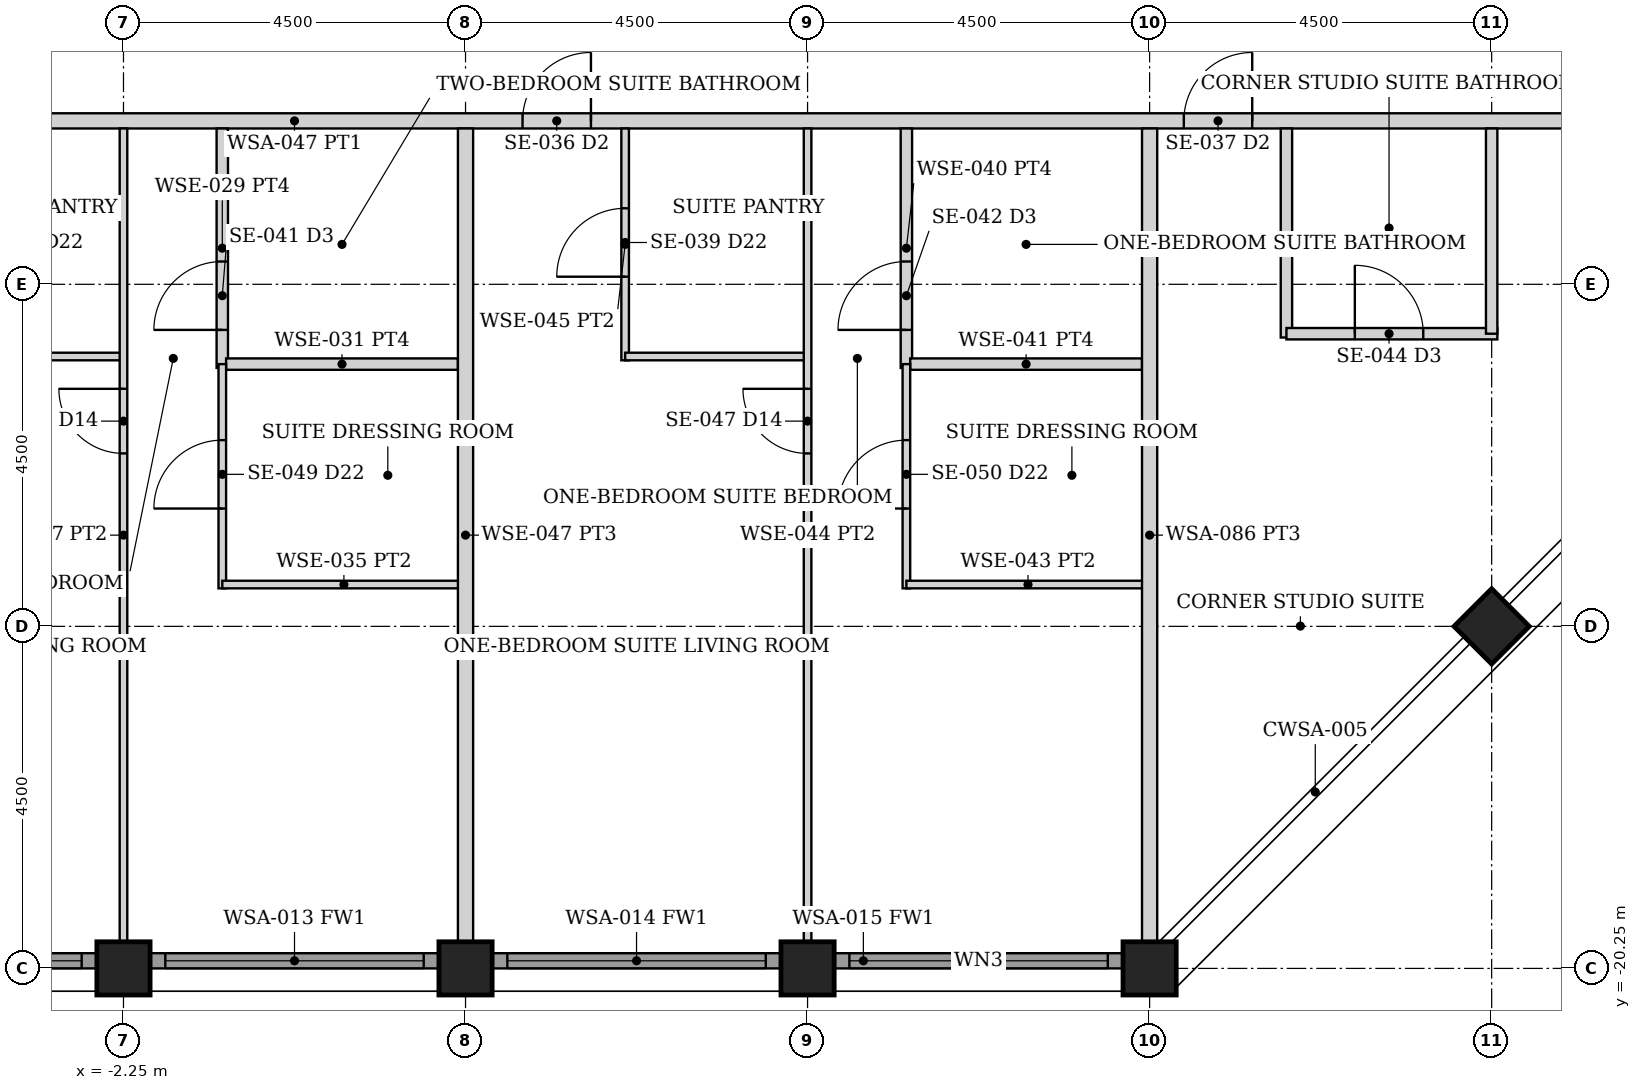
"""IFC4 building model, lengths in metres.
Left out: names, types, materials, properties, quantities, classifications, styles, units other than length and angle.
Written with IfcOpenShell. Run it as: python <this file> out.ifc"""

import sys

from ifc_helpers import new_model, si_unit, direction, frame, frame_2d, origin, origin_2d, place, context, subcontext, project, spatial, rectangle, hollow_rectangle, extrude, element, fill, save


model = new_model("IFC4")
c1 = context("Model", 3, precision=1e-05, world=origin(), true_north=direction((0.0, 1.0)))
c2 = subcontext(c1, "Body", "Model", "MODEL_VIEW")
j1 = project(units=[si_unit("LENGTHUNIT", "METRE"), si_unit("PLANEANGLEUNIT", "RADIAN")], contexts=[c1])
p1 = place(None, origin())
s1 = spatial("IfcSite", under=j1, at=p1, CompositionType="ELEMENT")
p2 = place(p1, origin())
s2 = spatial("IfcBuilding", under=s1, at=p2, CompositionType="ELEMENT")
p3 = place(p2, frame((0.0, 0.0, 245.8)))
s3 = spatial("IfcBuildingStorey", under=s2, at=p3, CompositionType="ELEMENT", Elevation=245.8)
for number, where, z_axis, x_axis in (
    (1, (-2.25, -20.25, 0.0), (0.0, 0.0, 1.0), (0.0, 1.0, 0.0)),
    (2, (2.25, -20.25, 0.0), (0.0, 0.0, 1.0), (0.0, 1.0, 0.0)),
    (3, (6.75, -20.25, 0.0), (0.0, 0.0, 1.0), (0.0, 1.0, 0.0)),
    (4, (11.25, -20.25, 0.0), (0.0, 0.0, 1.0), (0.0, 1.0, 0.0)),
    (5, (15.75, -15.75, 0.0), (0.0, 0.0, 1.0), (0.707, -0.707, 0.0)),
):
    element("IfcColumn", number, at=place(p3, frame(where, z_axis=z_axis, x_axis=x_axis)), inside=s3, PredefinedType="COLUMN", context=c2, shape_type="SweptSolid", body=[
        extrude(hollow_rectangle(XDim=0.7, YDim=0.7, WallThickness=0.035, at=origin_2d()), origin(), (0.0, 0.0, 1.0), 3.75),
    ])
p4 = place(p3, frame((-6.395, -20.15, 0.0), z_axis=(0.0, 0.0, 1.0), x_axis=(1.0, 0.0, 0.0)))
e6 = element("IfcWall", 6, at=p4, inside=s3, PredefinedType="SOLIDWALL", context=c2, shape_type="SweptSolid", body=[
    extrude(rectangle(XDim=3.79, YDim=0.2, at=frame_2d((1.895, 0.0))), origin(), (0.0, 0.0, 1.0), 2.629),
])
p5 = place(p4, frame((0.195, 0.0, 0.3)))
e7 = element("IfcOpeningElement", 7, at=p5, cuts=e6, PredefinedType="OPENING", context=c2, shape_type="SweptSolid", body=[
    extrude(rectangle(XDim=3.4, YDim=2.179, at=frame_2d((1.7, 1.089))), frame((0.0, 0.11, 0.0), z_axis=(0.0, -1.0, 0.0), x_axis=(1.0, 0.0, 0.0)), (0.0, 0.0, 1.0), 0.22),
])
p6 = place(p3, frame((-1.895, -20.15, 0.0), z_axis=(0.0, 0.0, 1.0), x_axis=(1.0, 0.0, 0.0)))
e8 = element("IfcWall", 8, at=p6, inside=s3, PredefinedType="SOLIDWALL", context=c2, shape_type="SweptSolid", body=[
    extrude(rectangle(XDim=3.79, YDim=0.2, at=frame_2d((1.895, 0.0))), origin(), (0.0, 0.0, 1.0), 2.629),
])
p7 = place(p6, frame((0.195, 0.0, 0.3)))
e9 = element("IfcOpeningElement", 9, at=p7, cuts=e8, PredefinedType="OPENING", context=c2, shape_type="SweptSolid", body=[
    extrude(rectangle(XDim=3.4, YDim=2.179, at=frame_2d((1.7, 1.089))), frame((0.0, 0.11, 0.0), z_axis=(0.0, -1.0, 0.0), x_axis=(1.0, 0.0, 0.0)), (0.0, 0.0, 1.0), 0.22),
])
p8 = place(p3, frame((2.605, -20.15, 0.0), z_axis=(0.0, 0.0, 1.0), x_axis=(1.0, 0.0, 0.0)))
e10 = element("IfcWall", 10, at=p8, inside=s3, PredefinedType="SOLIDWALL", context=c2, shape_type="SweptSolid", body=[
    extrude(rectangle(XDim=3.79, YDim=0.2, at=frame_2d((1.895, 0.0))), origin(), (0.0, 0.0, 1.0), 2.629),
])
p9 = place(p8, frame((0.195, 0.0, 0.3)))
e11 = element("IfcOpeningElement", 11, at=p9, cuts=e10, PredefinedType="OPENING", context=c2, shape_type="SweptSolid", body=[
    extrude(rectangle(XDim=3.4, YDim=2.179, at=frame_2d((1.7, 1.089))), frame((0.0, 0.11, 0.0), z_axis=(0.0, -1.0, 0.0), x_axis=(1.0, 0.0, 0.0)), (0.0, 0.0, 1.0), 0.22),
])
p10 = place(p3, frame((7.105, -20.15, 0.0), z_axis=(0.0, 0.0, 1.0), x_axis=(1.0, 0.0, 0.0)))
e12 = element("IfcWall", 12, at=p10, inside=s3, PredefinedType="SOLIDWALL", context=c2, shape_type="SweptSolid", body=[
    extrude(rectangle(XDim=3.79, YDim=0.2, at=frame_2d((1.895, 0.0))), origin(), (0.0, 0.0, 1.0), 2.629),
])
p11 = place(p10, frame((0.195, 0.0, 0.3)))
e13 = element("IfcOpeningElement", 13, at=p11, cuts=e12, PredefinedType="OPENING", context=c2, shape_type="SweptSolid", body=[
    extrude(rectangle(XDim=3.4, YDim=2.179, at=frame_2d((1.7, 1.089))), frame((0.0, 0.11, 0.0), z_axis=(0.0, -1.0, 0.0), x_axis=(1.0, 0.0, 0.0)), (0.0, 0.0, 1.0), 0.22),
])
p12 = place(p3, frame((-20.05, -9.1, 0.0), z_axis=(0.0, 0.0, 1.0), x_axis=(1.0, 0.0, 0.0)))
e14 = element("IfcWall", 14, at=p12, inside=s3, PredefinedType="PARTITIONING", context=c2, shape_type="SweptSolid", body=[
    extrude(rectangle(XDim=40.1, YDim=0.2, at=frame_2d((20.05, 0.0))), origin(), (0.0, 0.0, 1.0), 2.629),
])
p13 = place(p12, frame((14.05, 0.0, 0.0)))
e15 = element("IfcOpeningElement", 15, at=p13, cuts=e14, PredefinedType="OPENING", context=c2, shape_type="SweptSolid", body=[
    extrude(rectangle(XDim=0.9, YDim=2.1, at=frame_2d((0.45, 1.05))), frame((0.0, 0.11, 0.0), z_axis=(0.0, -1.0, 0.0), x_axis=(1.0, 0.0, 0.0)), (0.0, 0.0, 1.0), 0.22),
])
p14 = place(p12, frame((23.05, 0.0, 0.0)))
e16 = element("IfcOpeningElement", 16, at=p14, cuts=e14, PredefinedType="OPENING", context=c2, shape_type="SweptSolid", body=[
    extrude(rectangle(XDim=0.9, YDim=2.1, at=frame_2d((0.45, 1.05))), frame((0.0, 0.11, 0.0), z_axis=(0.0, -1.0, 0.0), x_axis=(1.0, 0.0, 0.0)), (0.0, 0.0, 1.0), 0.22),
])
p15 = place(p12, frame((31.75, 0.0, 0.0)))
e17 = element("IfcOpeningElement", 17, at=p15, cuts=e14, PredefinedType="OPENING", context=c2, shape_type="SweptSolid", body=[
    extrude(rectangle(XDim=0.9, YDim=2.1, at=frame_2d((0.45, 1.05))), frame((0.0, 0.11, 0.0), z_axis=(0.0, -1.0, 0.0), x_axis=(1.0, 0.0, 0.0)), (0.0, 0.0, 1.0), 0.22),
])
p16 = place(p12, frame((7.45, 0.0, 0.0)))
e18 = element("IfcOpeningElement", 18, at=p16, cuts=e14, PredefinedType="OPENING", context=c2, shape_type="SweptSolid", body=[
    extrude(rectangle(XDim=0.9, YDim=2.1, at=frame_2d((0.45, 1.05))), frame((0.0, 0.11, 0.0), z_axis=(0.0, -1.0, 0.0), x_axis=(1.0, 0.0, 0.0)), (0.0, 0.0, 1.0), 0.22),
])
p17 = place(p3, frame((-4.65, -12.2, 0.0), z_axis=(0.0, 0.0, 1.0), x_axis=(1.0, 0.0, 0.0)))
e19 = element("IfcWall", 19, at=p17, inside=s3, PredefinedType="PARTITIONING", context=c2, shape_type="SweptSolid", body=[
    extrude(rectangle(XDim=2.4, YDim=0.1, at=frame_2d((1.2, 0.0))), origin(), (0.0, 0.0, 1.0), 2.629),
])
p18 = place(p3, frame((-2.25, -19.9, 0.0), z_axis=(0.0, 0.0, 1.0), x_axis=(0.0, 1.0, 0.0)))
e20 = element("IfcWall", 20, at=p18, inside=s3, PredefinedType="PARTITIONING", context=c2, shape_type="SweptSolid", body=[
    extrude(rectangle(XDim=10.7, YDim=0.1, at=frame_2d((5.35, 0.0))), origin(), (0.0, 0.0, 1.0), 2.629),
])
p19 = place(p18, frame((6.425, 0.0, 0.0)))
e21 = element("IfcOpeningElement", 21, at=p19, cuts=e20, PredefinedType="OPENING", context=c2, shape_type="SweptSolid", body=[
    extrude(rectangle(XDim=0.85, YDim=2.1, at=frame_2d((0.425, 1.05))), frame((0.0, 0.06, 0.0), z_axis=(0.0, -1.0, 0.0), x_axis=(1.0, 0.0, 0.0)), (0.0, 0.0, 1.0), 0.12),
])
p20 = place(p3, frame((-0.95, -12.35, 0.0), z_axis=(0.0, 0.0, 1.0), x_axis=(0.0, 1.0, 0.0)))
e22 = element("IfcWall", 22, at=p20, inside=s3, PredefinedType="PARTITIONING", context=c2, shape_type="SweptSolid", body=[
    extrude(rectangle(XDim=3.15, YDim=0.15, at=frame_2d((1.575, 0.0))), origin(), (0.0, 0.0, 1.0), 2.629),
])
p21 = place(p20, frame((0.5, 0.0, 0.0)))
e23 = element("IfcOpeningElement", 23, at=p21, cuts=e22, PredefinedType="OPENING", context=c2, shape_type="SweptSolid", body=[
    extrude(rectangle(XDim=0.9, YDim=2.1, at=frame_2d((0.45, 1.05))), frame((0.0, 0.085, 0.0), z_axis=(0.0, -1.0, 0.0), x_axis=(1.0, 0.0, 0.0)), (0.0, 0.0, 1.0), 0.17),
])
p22 = place(p3, frame((-0.9, -12.3, 0.0), z_axis=(0.0, 0.0, 1.0), x_axis=(1.0, 0.0, 0.0)))
e24 = element("IfcWall", 24, at=p22, inside=s3, PredefinedType="PARTITIONING", context=c2, shape_type="SweptSolid", body=[
    extrude(rectangle(XDim=3.05, YDim=0.15, at=frame_2d((1.525, 0.0))), origin(), (0.0, 0.0, 1.0), 2.629),
])
p23 = place(p3, frame((-0.95, -15.25, 0.0), z_axis=(0.0, 0.0, 1.0), x_axis=(0.0, 1.0, 0.0)))
e25 = element("IfcWall", 25, at=p23, inside=s3, PredefinedType="PARTITIONING", context=c2, shape_type="SweptSolid", body=[
    extrude(rectangle(XDim=2.95, YDim=0.1, at=frame_2d((1.475, 0.0))), origin(), (0.0, 0.0, 1.0), 2.629),
])
p24 = place(p23, frame((1.05, 0.0, 0.0)))
e26 = element("IfcOpeningElement", 26, at=p24, cuts=e25, PredefinedType="OPENING", context=c2, shape_type="SweptSolid", body=[
    extrude(rectangle(XDim=0.9, YDim=2.1, at=frame_2d((0.45, 1.05))), frame((0.0, 0.06, 0.0), z_axis=(0.0, -1.0, 0.0), x_axis=(1.0, 0.0, 0.0)), (0.0, 0.0, 1.0), 0.12),
])
p25 = place(p3, frame((-0.95, -15.2, 0.0), z_axis=(0.0, 0.0, 1.0), x_axis=(1.0, 0.0, 0.0)))
e27 = element("IfcWall", 27, at=p25, inside=s3, PredefinedType="PARTITIONING", context=c2, shape_type="SweptSolid", body=[
    extrude(rectangle(XDim=3.2, YDim=0.1, at=frame_2d((1.6, 0.0))), origin(), (0.0, 0.0, 1.0), 2.629),
])
p26 = place(p3, frame((4.35, -12.25, 0.0), z_axis=(0.0, 0.0, 1.0), x_axis=(0.0, 1.0, 0.0)))
e28 = element("IfcWall", 28, at=p26, inside=s3, PredefinedType="PARTITIONING", context=c2, shape_type="SweptSolid", body=[
    extrude(rectangle(XDim=3.05, YDim=0.1, at=frame_2d((1.525, 0.0))), origin(), (0.0, 0.0, 1.0), 2.629),
])
p27 = place(p26, frame((1.1, 0.0, 0.0)))
e29 = element("IfcOpeningElement", 29, at=p27, cuts=e28, PredefinedType="OPENING", context=c2, shape_type="SweptSolid", body=[
    extrude(rectangle(XDim=0.9, YDim=2.1, at=frame_2d((0.45, 1.05))), frame((0.0, 0.06, 0.0), z_axis=(0.0, -1.0, 0.0), x_axis=(1.0, 0.0, 0.0)), (0.0, 0.0, 1.0), 0.12),
])
p28 = place(p3, frame((4.35, -12.2, 0.0), z_axis=(0.0, 0.0, 1.0), x_axis=(1.0, 0.0, 0.0)))
e30 = element("IfcWall", 30, at=p28, inside=s3, PredefinedType="PARTITIONING", context=c2, shape_type="SweptSolid", body=[
    extrude(rectangle(XDim=2.4, YDim=0.1, at=frame_2d((1.2, 0.0))), origin(), (0.0, 0.0, 1.0), 2.629),
])
p29 = place(p3, frame((6.75, -19.9, 0.0), z_axis=(0.0, 0.0, 1.0), x_axis=(0.0, 1.0, 0.0)))
e31 = element("IfcWall", 31, at=p29, inside=s3, PredefinedType="PARTITIONING", context=c2, shape_type="SweptSolid", body=[
    extrude(rectangle(XDim=10.7, YDim=0.1, at=frame_2d((5.35, 0.0))), origin(), (0.0, 0.0, 1.0), 2.629),
])
p30 = place(p29, frame((6.425, 0.0, 0.0)))
e32 = element("IfcOpeningElement", 32, at=p30, cuts=e31, PredefinedType="OPENING", context=c2, shape_type="SweptSolid", body=[
    extrude(rectangle(XDim=0.85, YDim=2.1, at=frame_2d((0.425, 1.05))), frame((0.0, 0.06, 0.0), z_axis=(0.0, -1.0, 0.0), x_axis=(1.0, 0.0, 0.0)), (0.0, 0.0, 1.0), 0.12),
])
p31 = place(p3, frame((8.05, -12.35, 0.0), z_axis=(0.0, 0.0, 1.0), x_axis=(0.0, 1.0, 0.0)))
e33 = element("IfcWall", 33, at=p31, inside=s3, PredefinedType="PARTITIONING", context=c2, shape_type="SweptSolid", body=[
    extrude(rectangle(XDim=3.15, YDim=0.15, at=frame_2d((1.575, 0.0))), origin(), (0.0, 0.0, 1.0), 2.629),
])
p32 = place(p31, frame((0.5, 0.0, 0.0)))
e34 = element("IfcOpeningElement", 34, at=p32, cuts=e33, PredefinedType="OPENING", context=c2, shape_type="SweptSolid", body=[
    extrude(rectangle(XDim=0.9, YDim=2.1, at=frame_2d((0.45, 1.05))), frame((0.0, 0.085, 0.0), z_axis=(0.0, -1.0, 0.0), x_axis=(1.0, 0.0, 0.0)), (0.0, 0.0, 1.0), 0.17),
])
p33 = place(p3, frame((8.1, -12.3, 0.0), z_axis=(0.0, 0.0, 1.0), x_axis=(1.0, 0.0, 0.0)))
e35 = element("IfcWall", 35, at=p33, inside=s3, PredefinedType="PARTITIONING", context=c2, shape_type="SweptSolid", body=[
    extrude(rectangle(XDim=3.05, YDim=0.15, at=frame_2d((1.525, 0.0))), origin(), (0.0, 0.0, 1.0), 2.629),
])
p34 = place(p3, frame((8.05, -15.25, 0.0), z_axis=(0.0, 0.0, 1.0), x_axis=(0.0, 1.0, 0.0)))
e36 = element("IfcWall", 36, at=p34, inside=s3, PredefinedType="PARTITIONING", context=c2, shape_type="SweptSolid", body=[
    extrude(rectangle(XDim=2.95, YDim=0.1, at=frame_2d((1.475, 0.0))), origin(), (0.0, 0.0, 1.0), 2.629),
])
p35 = place(p34, frame((1.05, 0.0, 0.0)))
e37 = element("IfcOpeningElement", 37, at=p35, cuts=e36, PredefinedType="OPENING", context=c2, shape_type="SweptSolid", body=[
    extrude(rectangle(XDim=0.9, YDim=2.1, at=frame_2d((0.45, 1.05))), frame((0.0, 0.06, 0.0), z_axis=(0.0, -1.0, 0.0), x_axis=(1.0, 0.0, 0.0)), (0.0, 0.0, 1.0), 0.12),
])
p36 = place(p3, frame((8.05, -15.2, 0.0), z_axis=(0.0, 0.0, 1.0), x_axis=(1.0, 0.0, 0.0)))
e38 = element("IfcWall", 38, at=p36, inside=s3, PredefinedType="PARTITIONING", context=c2, shape_type="SweptSolid", body=[
    extrude(rectangle(XDim=3.2, YDim=0.1, at=frame_2d((1.6, 0.0))), origin(), (0.0, 0.0, 1.0), 2.629),
])
for number, where, z_axis, x_axis in (
    (39, (2.25, -19.9, 0.0), (0.0, 0.0, 1.0), (0.0, 1.0, 0.0)),
    (40, (11.25, -19.9, 0.0), (0.0, 0.0, 1.0), (0.0, 1.0, 0.0)),
):
    element("IfcWall", number, at=place(p3, frame(where, z_axis=z_axis, x_axis=x_axis)), inside=s3, PredefinedType="PARTITIONING", context=c2, shape_type="SweptSolid", body=[
        extrude(rectangle(XDim=10.7, YDim=0.2, at=frame_2d((5.35, 0.0))), origin(), (0.0, 0.0, 1.0), 2.629),
    ])
p37 = place(p3, frame((13.05, -11.95, 0.0), z_axis=(0.0, 0.0, 1.0), x_axis=(0.0, 1.0, 0.0)))
e41 = element("IfcWall", 41, at=p37, inside=s3, PredefinedType="PARTITIONING", context=c2, shape_type="SweptSolid", body=[
    extrude(rectangle(XDim=2.75, YDim=0.15, at=frame_2d((1.375, 0.0))), origin(), (0.0, 0.0, 1.0), 2.629),
])
p38 = place(p3, frame((13.05, -11.9, 0.0), z_axis=(0.0, 0.0, 1.0), x_axis=(1.0, 0.0, 0.0)))
e42 = element("IfcWall", 42, at=p38, inside=s3, PredefinedType="PARTITIONING", context=c2, shape_type="SweptSolid", body=[
    extrude(rectangle(XDim=2.775, YDim=0.15, at=frame_2d((1.387, 0.0))), origin(), (0.0, 0.0, 1.0), 2.629),
])
p39 = place(p38, frame((0.9, 0.0, 0.0)))
e43 = element("IfcOpeningElement", 43, at=p39, cuts=e42, PredefinedType="OPENING", context=c2, shape_type="SweptSolid", body=[
    extrude(rectangle(XDim=0.9, YDim=2.1, at=frame_2d((0.45, 1.05))), frame((0.0, 0.085, 0.0), z_axis=(0.0, -1.0, 0.0), x_axis=(1.0, 0.0, 0.0)), (0.0, 0.0, 1.0), 0.17),
])
p40 = place(p3, frame((15.75, -11.9, 0.0), z_axis=(0.0, 0.0, 1.0), x_axis=(0.0, 1.0, 0.0)))
e44 = element("IfcWall", 44, at=p40, inside=s3, PredefinedType="PARTITIONING", context=c2, shape_type="SweptSolid", body=[
    extrude(rectangle(XDim=2.7, YDim=0.15, at=frame_2d((1.35, 0.0))), origin(), (0.0, 0.0, 1.0), 2.629),
])
p41 = place(p5, origin())
e45 = element("IfcWindow", 45, at=p41, inside=s3, PartitioningType="SINGLE_PANEL", PredefinedType="WINDOW", context=c2, shape_type="SweptSolid", body=[
    extrude(rectangle(XDim=3.4, YDim=2.179, at=frame_2d((1.7, 1.089))), frame((0.0, 0.03, 0.0), z_axis=(0.0, -1.0, 0.0), x_axis=(1.0, 0.0, 0.0)), (0.0, 0.0, 1.0), 0.06),
])
fill(e7, e45)
p42 = place(p7, origin())
e46 = element("IfcWindow", 46, at=p42, inside=s3, PartitioningType="SINGLE_PANEL", PredefinedType="WINDOW", context=c2, shape_type="SweptSolid", body=[
    extrude(rectangle(XDim=3.4, YDim=2.179, at=frame_2d((1.7, 1.089))), frame((0.0, 0.03, 0.0), z_axis=(0.0, -1.0, 0.0), x_axis=(1.0, 0.0, 0.0)), (0.0, 0.0, 1.0), 0.06),
])
fill(e9, e46)
p43 = place(p9, origin())
e47 = element("IfcWindow", 47, at=p43, inside=s3, PartitioningType="SINGLE_PANEL", PredefinedType="WINDOW", context=c2, shape_type="SweptSolid", body=[
    extrude(rectangle(XDim=3.4, YDim=2.179, at=frame_2d((1.7, 1.089))), frame((0.0, 0.03, 0.0), z_axis=(0.0, -1.0, 0.0), x_axis=(1.0, 0.0, 0.0)), (0.0, 0.0, 1.0), 0.06),
])
fill(e11, e47)
p44 = place(p11, origin())
e48 = element("IfcWindow", 48, at=p44, inside=s3, PartitioningType="SINGLE_PANEL", PredefinedType="WINDOW", context=c2, shape_type="SweptSolid", body=[
    extrude(rectangle(XDim=3.4, YDim=2.179, at=frame_2d((1.7, 1.089))), frame((0.0, 0.03, 0.0), z_axis=(0.0, -1.0, 0.0), x_axis=(1.0, 0.0, 0.0)), (0.0, 0.0, 1.0), 0.06),
])
fill(e13, e48)
p45 = place(p24, origin())
e49 = element("IfcDoor", 49, at=p45, inside=s3, OperationType="SINGLE_SWING_LEFT", PredefinedType="DOOR", context=c2, shape_type="SweptSolid", body=[
    extrude(rectangle(XDim=0.9, YDim=2.1, at=frame_2d((0.45, 1.05))), frame((0.0, 0.025, 0.0), z_axis=(0.0, -1.0, 0.0), x_axis=(1.0, 0.0, 0.0)), (0.0, 0.0, 1.0), 0.05),
])
fill(e26, e49)
p46 = place(p19, origin())
e50 = element("IfcDoor", 50, at=p46, inside=s3, OperationType="SINGLE_SWING_RIGHT", PredefinedType="DOOR", context=c2, shape_type="SweptSolid", body=[
    extrude(rectangle(XDim=0.85, YDim=2.1, at=frame_2d((0.425, 1.05))), frame((0.0, 0.025, 0.0), z_axis=(0.0, -1.0, 0.0), x_axis=(1.0, 0.0, 0.0)), (0.0, 0.0, 1.0), 0.05),
])
fill(e21, e50)
p47 = place(p21, origin())
e51 = element("IfcDoor", 51, at=p47, inside=s3, OperationType="SINGLE_SWING_LEFT", PredefinedType="DOOR", context=c2, shape_type="SweptSolid", body=[
    extrude(rectangle(XDim=0.9, YDim=2.1, at=frame_2d((0.45, 1.05))), frame((0.0, 0.025, 0.0), z_axis=(0.0, -1.0, 0.0), x_axis=(1.0, 0.0, 0.0)), (0.0, 0.0, 1.0), 0.05),
])
fill(e23, e51)
p48 = place(p14, origin())
e52 = element("IfcDoor", 52, at=p48, inside=s3, OperationType="SINGLE_SWING_RIGHT", PredefinedType="DOOR", context=c2, shape_type="SweptSolid", body=[
    extrude(rectangle(XDim=0.9, YDim=2.1, at=frame_2d((0.45, 1.05))), frame((0.0, 0.025, 0.0), z_axis=(0.0, -1.0, 0.0), x_axis=(1.0, 0.0, 0.0)), (0.0, 0.0, 1.0), 0.05),
])
fill(e16, e52)
p49 = place(p27, origin())
e53 = element("IfcDoor", 53, at=p49, inside=s3, OperationType="SINGLE_SWING_LEFT", PredefinedType="DOOR", context=c2, shape_type="SweptSolid", body=[
    extrude(rectangle(XDim=0.9, YDim=2.1, at=frame_2d((0.45, 1.05))), frame((0.0, 0.025, 0.0), z_axis=(0.0, -1.0, 0.0), x_axis=(1.0, 0.0, 0.0)), (0.0, 0.0, 1.0), 0.05),
])
fill(e29, e53)
p50 = place(p35, origin())
e54 = element("IfcDoor", 54, at=p50, inside=s3, OperationType="SINGLE_SWING_LEFT", PredefinedType="DOOR", context=c2, shape_type="SweptSolid", body=[
    extrude(rectangle(XDim=0.9, YDim=2.1, at=frame_2d((0.45, 1.05))), frame((0.0, 0.025, 0.0), z_axis=(0.0, -1.0, 0.0), x_axis=(1.0, 0.0, 0.0)), (0.0, 0.0, 1.0), 0.05),
])
fill(e37, e54)
p51 = place(p30, origin())
e55 = element("IfcDoor", 55, at=p51, inside=s3, OperationType="SINGLE_SWING_RIGHT", PredefinedType="DOOR", context=c2, shape_type="SweptSolid", body=[
    extrude(rectangle(XDim=0.85, YDim=2.1, at=frame_2d((0.425, 1.05))), frame((0.0, 0.025, 0.0), z_axis=(0.0, -1.0, 0.0), x_axis=(1.0, 0.0, 0.0)), (0.0, 0.0, 1.0), 0.05),
])
fill(e32, e55)
p52 = place(p32, origin())
e56 = element("IfcDoor", 56, at=p52, inside=s3, OperationType="SINGLE_SWING_LEFT", PredefinedType="DOOR", context=c2, shape_type="SweptSolid", body=[
    extrude(rectangle(XDim=0.9, YDim=2.1, at=frame_2d((0.45, 1.05))), frame((0.0, 0.025, 0.0), z_axis=(0.0, -1.0, 0.0), x_axis=(1.0, 0.0, 0.0)), (0.0, 0.0, 1.0), 0.05),
])
fill(e34, e56)
p53 = place(p15, origin())
e57 = element("IfcDoor", 57, at=p53, inside=s3, OperationType="SINGLE_SWING_RIGHT", PredefinedType="DOOR", context=c2, shape_type="SweptSolid", body=[
    extrude(rectangle(XDim=0.9, YDim=2.1, at=frame_2d((0.45, 1.05))), frame((0.0, 0.025, 0.0), z_axis=(0.0, -1.0, 0.0), x_axis=(1.0, 0.0, 0.0)), (0.0, 0.0, 1.0), 0.05),
])
fill(e17, e57)
p54 = place(p39, origin())
e58 = element("IfcDoor", 58, at=p54, inside=s3, OperationType="SINGLE_SWING_LEFT", PredefinedType="DOOR", context=c2, shape_type="SweptSolid", body=[
    extrude(rectangle(XDim=0.9, YDim=2.1, at=frame_2d((0.45, 1.05))), frame((0.0, 0.025, 0.0), z_axis=(0.0, -1.0, 0.0), x_axis=(1.0, 0.0, 0.0)), (0.0, 0.0, 1.0), 0.05),
])
fill(e43, e58)
save(model, sys.argv[1])
